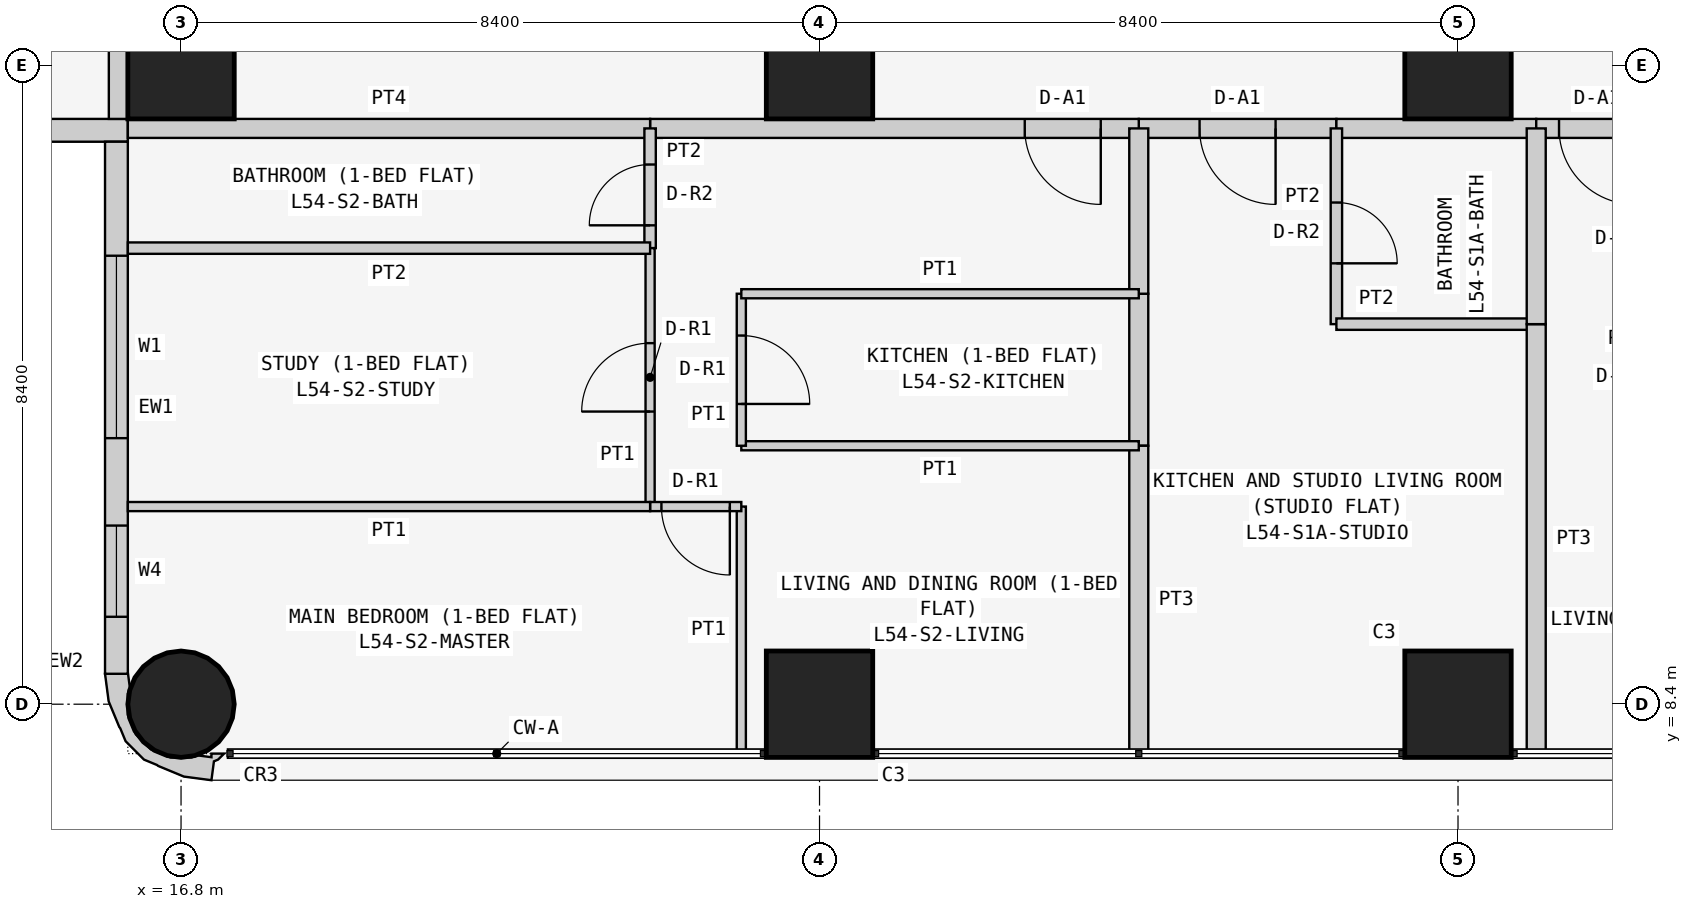
"""IFC4 building model, lengths in metres.
Left out: names, types, materials, properties, quantities, classifications, styles, units other than length and angle.
Written with IfcOpenShell. Run it as: python <this file> out.ifc"""

import sys

from ifc_helpers import new_model, si_unit, direction, frame, frame_2d, origin, origin_2d, place, context, subcontext, project, spatial, polyline, rectangle, circle, outline, extrude, element, fill, save


model = new_model("IFC4")
c1 = context("Model", 3, precision=1e-05, world=origin(), true_north=direction((0.0, 1.0)))
c2 = subcontext(c1, "Body", "Model", "MODEL_VIEW")
j1 = project(units=[si_unit("LENGTHUNIT", "METRE"), si_unit("PLANEANGLEUNIT", "RADIAN")], contexts=[c1])
p1 = place(None, origin())
s1 = spatial("IfcSite", under=j1, at=p1, CompositionType="ELEMENT")
p2 = place(p1, origin())
s2 = spatial("IfcBuilding", under=s1, at=p2, CompositionType="ELEMENT")
p3 = place(p2, frame((0.0, 0.0, 208.5)))
s3 = spatial("IfcBuildingStorey", under=s2, at=p3, CompositionType="ELEMENT", Elevation=208.5)
p4 = place(p3, frame((16.8, 8.4, 0.0), z_axis=(0.0, 0.0, 1.0), x_axis=(1.0, 0.0, 0.0)))
e1 = element("IfcColumn", 1, at=p4, inside=s3, PredefinedType="COLUMN", context=c2, shape_type="SweptSolid", body=[
    extrude(circle(Radius=0.7, at=origin_2d()), origin(), (0.0, 0.0, 1.0), 3.6),
])
for number, where, z_axis, x_axis in (
    (2, (16.8, 16.8, 0.0), (0.0, 0.0, 1.0), (1.0, 0.0, 0.0)),
    (3, (25.2, 8.4, 0.0), (0.0, 0.0, 1.0), (1.0, 0.0, 0.0)),
    (4, (25.2, 16.8, 0.0), (0.0, 0.0, 1.0), (1.0, 0.0, 0.0)),
    (5, (33.6, 8.4, 0.0), (0.0, 0.0, 1.0), (1.0, 0.0, 0.0)),
    (6, (33.6, 16.8, 0.0), (0.0, 0.0, 1.0), (1.0, 0.0, 0.0)),
):
    element("IfcColumn", number, at=place(p3, frame(where, z_axis=z_axis, x_axis=x_axis)), inside=s3, PredefinedType="COLUMN", context=c2, shape_type="SweptSolid", body=[
        extrude(rectangle(XDim=1.4, YDim=1.4, at=origin_2d()), origin(), (0.0, 0.0, 1.0), 3.6),
    ])
p5 = place(p3, frame((0.4, 15.95, 0.0), z_axis=(0.0, 0.0, 1.0), x_axis=(1.0, 0.0, 0.0)))
e7 = element("IfcWall", 7, at=p5, inside=s3, PredefinedType="SOLIDWALL", context=c2, shape_type="SweptSolid", body=[
    extrude(rectangle(XDim=15.7, YDim=0.3, at=frame_2d((7.85, 0.0))), origin(), (0.0, 0.0, 1.0), 3.45),
])
p6 = place(p5, frame((12.4, 0.0, 0.9)))
e8 = element("IfcOpeningElement", 8, at=p6, cuts=e7, PredefinedType="OPENING", context=c2, shape_type="SweptSolid", body=[
    extrude(rectangle(XDim=1.8, YDim=1.5, at=frame_2d((0.9, 0.75))), frame((0.0, 0.16, 0.0), z_axis=(0.0, -1.0, 0.0), x_axis=(1.0, 0.0, 0.0)), (0.0, 0.0, 1.0), 0.32),
])
p7 = place(p5, frame((9.55, 0.0, 1.5)))
e9 = element("IfcOpeningElement", 9, at=p7, cuts=e7, PredefinedType="OPENING", context=c2, shape_type="SweptSolid", body=[
    extrude(rectangle(XDim=0.9, YDim=0.7, at=frame_2d((0.45, 0.35))), frame((0.0, 0.16, 0.0), z_axis=(0.0, -1.0, 0.0), x_axis=(1.0, 0.0, 0.0)), (0.0, 0.0, 1.0), 0.32),
])
p8 = place(p5, frame((5.1, 0.0, 0.9)))
e10 = element("IfcOpeningElement", 10, at=p8, cuts=e7, PredefinedType="OPENING", context=c2, shape_type="SweptSolid", body=[
    extrude(rectangle(XDim=1.8, YDim=1.5, at=frame_2d((0.9, 0.75))), frame((0.0, 0.16, 0.0), z_axis=(0.0, -1.0, 0.0), x_axis=(1.0, 0.0, 0.0)), (0.0, 0.0, 1.0), 0.32),
])
p9 = place(p5, frame((2.0, 0.0, 0.0)))
e11 = element("IfcOpeningElement", 11, at=p9, cuts=e7, PredefinedType="OPENING", context=c2, shape_type="SweptSolid", body=[
    extrude(rectangle(XDim=0.9, YDim=2.4, at=frame_2d((0.45, 1.2))), frame((0.0, 0.16, 0.0), z_axis=(0.0, -1.0, 0.0), x_axis=(1.0, 0.0, 0.0)), (0.0, 0.0, 1.0), 0.32),
])
p10 = place(p5, frame((0.7, 0.0, 0.9)))
e12 = element("IfcOpeningElement", 12, at=p10, cuts=e7, PredefinedType="OPENING", context=c2, shape_type="SweptSolid", body=[
    extrude(rectangle(XDim=1.2, YDim=1.5, at=frame_2d((0.6, 0.75))), frame((0.0, 0.16, 0.0), z_axis=(0.0, -1.0, 0.0), x_axis=(1.0, 0.0, 0.0)), (0.0, 0.0, 1.0), 0.32),
])
p11 = place(p3, frame((15.95, 15.8, 0.0), z_axis=(0.0, 0.0, 1.0), x_axis=(0.0, -1.0, 0.0)))
e13 = element("IfcWall", 13, at=p11, inside=s3, PredefinedType="SOLIDWALL", context=c2, shape_type="SweptSolid", body=[
    extrude(rectangle(XDim=7.0, YDim=0.3, at=frame_2d((3.5, 0.0))), origin(), (0.0, 0.0, 1.0), 3.45),
])
p12 = place(p11, frame((1.5, 0.0, 0.9)))
e14 = element("IfcOpeningElement", 14, at=p12, cuts=e13, PredefinedType="OPENING", context=c2, shape_type="SweptSolid", body=[
    extrude(rectangle(XDim=2.4, YDim=1.5, at=frame_2d((1.2, 0.75))), frame((0.0, 0.16, 0.0), z_axis=(0.0, -1.0, 0.0), x_axis=(1.0, 0.0, 0.0)), (0.0, 0.0, 1.0), 0.32),
])
p13 = place(p11, frame((5.05, 0.0, 0.9)))
e15 = element("IfcOpeningElement", 15, at=p13, cuts=e13, PredefinedType="OPENING", context=c2, shape_type="SweptSolid", body=[
    extrude(rectangle(XDim=1.2, YDim=1.5, at=frame_2d((0.6, 0.75))), frame((0.0, 0.16, 0.0), z_axis=(0.0, -1.0, 0.0), x_axis=(1.0, 0.0, 0.0)), (0.0, 0.0, 1.0), 0.32),
])
p14 = place(p3, frame((16.076, 8.69, 0.0), z_axis=(0.0, 0.0, 1.0), x_axis=(-0.439933741929, -0.898030234854, 0.0)))
e16 = element("IfcWall", 16, at=p14, inside=s3, PredefinedType="SOLIDWALL", context=c2, shape_type="SweptSolid", body=[
    extrude(outline(polyline([(0.664, 1.577), (0.426, 1.497), (0.382, 1.536), (0.276, 1.572), (0.349, 1.423), (0.392, 1.444), (0.453, 1.261), (0.51, 1.211), (0.632, 0.961), (0.65, 0.683), (0.56, 0.419), (0.375, 0.21), (0.125, 0.087), (0.05, 0.082), (-0.127, -0.035), (-0.145, -0.044), (0.022, -0.296), (0.327, -0.094), (0.568, 0.18), (0.578, 0.199), (0.7, 0.337), (0.811, 0.661), (0.799, 0.846), (0.803, 0.866), (0.78, 1.231), (0.664, 1.577)])), origin(), (0.0, 0.0, 1.0), 3.45),
])
p15 = place(p3, frame((32.0, 15.975, 0.0), z_axis=(0.0, 0.0, 1.0), x_axis=(-1.0, 0.0, 0.0)))
e17 = element("IfcWall", 17, at=p15, inside=s3, PredefinedType="PARTITIONING", context=c2, shape_type="SweptSolid", body=[
    extrude(rectangle(XDim=2.6, YDim=0.25, at=frame_2d((1.3, 0.0))), origin(), (0.0, 0.0, 1.0), 3.45),
])
p16 = place(p15, frame((0.8, 0.0, 0.0)))
e18 = element("IfcOpeningElement", 18, at=p16, cuts=e17, PredefinedType="OPENING", context=c2, shape_type="SweptSolid", body=[
    extrude(rectangle(XDim=1.0, YDim=2.1, at=frame_2d((0.5, 1.05))), frame((0.0, 0.135, 0.0), z_axis=(0.0, -1.0, 0.0), x_axis=(1.0, 0.0, 0.0)), (0.0, 0.0, 1.0), 0.27),
])
p17 = place(p3, frame((34.629, 15.975, 0.0), z_axis=(0.0, 0.0, 1.0), x_axis=(-1.0, 0.0, 0.0)))
e19 = element("IfcWall", 19, at=p17, inside=s3, PredefinedType="PARTITIONING", context=c2, shape_type="SweptSolid", body=[
    extrude(rectangle(XDim=2.629, YDim=0.25, at=frame_2d((1.314, 0.0))), origin(), (0.0, 0.0, 1.0), 3.45),
])
p18 = place(p3, frame((36.229, 15.975, 0.0), z_axis=(0.0, 0.0, 1.0), x_axis=(-1.0, 0.0, 0.0)))
e20 = element("IfcWall", 20, at=p18, inside=s3, PredefinedType="PARTITIONING", context=c2, shape_type="SweptSolid", body=[
    extrude(rectangle(XDim=1.6, YDim=0.25, at=frame_2d((0.8, 0.0))), origin(), (0.0, 0.0, 1.0), 3.45),
])
p19 = place(p18, frame((0.3, 0.0, 0.0)))
e21 = element("IfcOpeningElement", 21, at=p19, cuts=e20, PredefinedType="OPENING", context=c2, shape_type="SweptSolid", body=[
    extrude(rectangle(XDim=1.0, YDim=2.1, at=frame_2d((0.5, 1.05))), frame((0.0, 0.135, 0.0), z_axis=(0.0, -1.0, 0.0), x_axis=(1.0, 0.0, 0.0)), (0.0, 0.0, 1.0), 0.27),
])
p20 = place(p3, frame((29.4, 15.975, 0.0), z_axis=(0.0, 0.0, 1.0), x_axis=(-1.0, 0.0, 0.0)))
e22 = element("IfcWall", 22, at=p20, inside=s3, PredefinedType="PARTITIONING", context=c2, shape_type="SweptSolid", body=[
    extrude(rectangle(XDim=6.429, YDim=0.25, at=frame_2d((3.214, 0.0))), origin(), (0.0, 0.0, 1.0), 3.45),
])
p21 = place(p20, frame((0.5, 0.0, 0.0)))
e23 = element("IfcOpeningElement", 23, at=p21, cuts=e22, PredefinedType="OPENING", context=c2, shape_type="SweptSolid", body=[
    extrude(rectangle(XDim=1.0, YDim=2.1, at=frame_2d((0.5, 1.05))), frame((0.0, 0.135, 0.0), z_axis=(0.0, -1.0, 0.0), x_axis=(1.0, 0.0, 0.0)), (0.0, 0.0, 1.0), 0.27),
])
for number, where, z_axis, x_axis in (
    (24, (22.971, 15.975, 0.0), (0.0, 0.0, 1.0), (-1.0, 0.0, 0.0)),
    (25, (15.975, 16.1, 0.0), (0.0, 0.0, 1.0), (0.0, 1.0, 0.0)),
):
    element("IfcWall", number, at=place(p3, frame(where, z_axis=z_axis, x_axis=x_axis)), inside=s3, PredefinedType="PARTITIONING", context=c2, shape_type="SweptSolid", body=[
        extrude(rectangle(XDim=6.871, YDim=0.25, at=frame_2d((3.436, 0.0))), origin(), (0.0, 0.0, 1.0), 3.45),
    ])
p22 = place(p3, frame((32.0, 15.975, 0.0), z_axis=(0.0, 0.0, 1.0), x_axis=(0.0, -1.0, 0.0)))
e26 = element("IfcWall", 26, at=p22, inside=s3, PredefinedType="PARTITIONING", context=c2, shape_type="SweptSolid", body=[
    extrude(rectangle(XDim=2.575, YDim=0.15, at=frame_2d((1.288, 0.0))), origin(), (0.0, 0.0, 1.0), 3.45),
])
p23 = place(p22, frame((0.975, 0.0, 0.0)))
e27 = element("IfcOpeningElement", 27, at=p23, cuts=e26, PredefinedType="OPENING", context=c2, shape_type="SweptSolid", body=[
    extrude(rectangle(XDim=0.8, YDim=2.1, at=frame_2d((0.4, 1.05))), frame((0.0, 0.085, 0.0), z_axis=(0.0, -1.0, 0.0), x_axis=(1.0, 0.0, 0.0)), (0.0, 0.0, 1.0), 0.17),
])
p24 = place(p3, frame((32.0, 13.4, 0.0), z_axis=(0.0, 0.0, 1.0), x_axis=(1.0, 0.0, 0.0)))
e28 = element("IfcWall", 28, at=p24, inside=s3, PredefinedType="PARTITIONING", context=c2, shape_type="SweptSolid", body=[
    extrude(rectangle(XDim=2.629, YDim=0.15, at=frame_2d((1.314, 0.0))), origin(), (0.0, 0.0, 1.0), 3.45),
])
p25 = place(p3, frame((34.629, 13.4, 0.0), z_axis=(0.0, 0.0, 1.0), x_axis=(0.0, -1.0, 0.0)))
e29 = element("IfcWall", 29, at=p25, inside=s3, PredefinedType="PARTITIONING", context=c2, shape_type="SweptSolid", body=[
    extrude(rectangle(XDim=5.65, YDim=0.25, at=frame_2d((2.825, 0.0))), origin(), (0.0, 0.0, 1.0), 3.45),
])
p26 = place(p3, frame((29.4, 11.8, 0.0), z_axis=(0.0, 0.0, 1.0), x_axis=(0.0, 1.0, 0.0)))
e30 = element("IfcWall", 30, at=p26, inside=s3, PredefinedType="PARTITIONING", context=c2, shape_type="SweptSolid", body=[
    extrude(rectangle(XDim=2.0, YDim=0.25, at=frame_2d((1.0, 0.0))), origin(), (0.0, 0.0, 1.0), 2.848),
])
p27 = place(p3, frame((29.4, 7.75, 0.0), z_axis=(0.0, 0.0, 1.0), x_axis=(0.0, 1.0, 0.0)))
e31 = element("IfcWall", 31, at=p27, inside=s3, PredefinedType="PARTITIONING", context=c2, shape_type="SweptSolid", body=[
    extrude(rectangle(XDim=4.05, YDim=0.25, at=frame_2d((2.025, 0.0))), origin(), (0.0, 0.0, 1.0), 2.848),
])
p28 = place(p3, frame((29.4, 13.8, 0.0), z_axis=(0.0, 0.0, 1.0), x_axis=(0.0, 1.0, 0.0)))
e32 = element("IfcWall", 32, at=p28, inside=s3, PredefinedType="PARTITIONING", context=c2, shape_type="SweptSolid", body=[
    extrude(rectangle(XDim=2.175, YDim=0.25, at=frame_2d((1.087, 0.0))), origin(), (0.0, 0.0, 1.0), 2.848),
])
p29 = place(p3, frame((34.629, 13.4, 0.0), z_axis=(0.0, 0.0, 1.0), x_axis=(0.0, 1.0, 0.0)))
e33 = element("IfcWall", 33, at=p29, inside=s3, PredefinedType="PARTITIONING", context=c2, shape_type="SweptSolid", body=[
    extrude(rectangle(XDim=2.575, YDim=0.25, at=frame_2d((1.288, 0.0))), origin(), (0.0, 0.0, 1.0), 3.45),
])
p30 = place(p3, frame((29.4, 11.8, 0.0), z_axis=(0.0, 0.0, 1.0), x_axis=(-1.0, 0.0, 0.0)))
e34 = element("IfcWall", 34, at=p30, inside=s3, PredefinedType="PARTITIONING", context=c2, shape_type="SweptSolid", body=[
    extrude(rectangle(XDim=5.229, YDim=0.12, at=frame_2d((2.615, 0.0))), origin(), (0.0, 0.0, 1.0), 3.45),
])
p31 = place(p3, frame((24.171, 11.8, 0.0), z_axis=(0.0, 0.0, 1.0), x_axis=(0.0, 1.0, 0.0)))
e35 = element("IfcWall", 35, at=p31, inside=s3, PredefinedType="PARTITIONING", context=c2, shape_type="SweptSolid", body=[
    extrude(rectangle(XDim=2.0, YDim=0.12, at=frame_2d((1.0, 0.0))), origin(), (0.0, 0.0, 1.0), 3.45),
])
p32 = place(p31, frame((0.55, 0.0, 0.0)))
e36 = element("IfcOpeningElement", 36, at=p32, cuts=e35, PredefinedType="OPENING", context=c2, shape_type="SweptSolid", body=[
    extrude(rectangle(XDim=0.9, YDim=2.1, at=frame_2d((0.45, 1.05))), frame((0.0, 0.07, 0.0), z_axis=(0.0, -1.0, 0.0), x_axis=(1.0, 0.0, 0.0)), (0.0, 0.0, 1.0), 0.14),
])
p33 = place(p3, frame((24.171, 13.8, 0.0), z_axis=(0.0, 0.0, 1.0), x_axis=(1.0, 0.0, 0.0)))
e37 = element("IfcWall", 37, at=p33, inside=s3, PredefinedType="PARTITIONING", context=c2, shape_type="SweptSolid", body=[
    extrude(rectangle(XDim=5.229, YDim=0.12, at=frame_2d((2.615, 0.0))), origin(), (0.0, 0.0, 1.0), 3.45),
])
p34 = place(p3, frame((22.971, 14.4, 0.0), z_axis=(0.0, 0.0, 1.0), x_axis=(0.0, 1.0, 0.0)))
e38 = element("IfcWall", 38, at=p34, inside=s3, PredefinedType="PARTITIONING", context=c2, shape_type="SweptSolid", body=[
    extrude(rectangle(XDim=1.575, YDim=0.15, at=frame_2d((0.788, 0.0))), origin(), (0.0, 0.0, 1.0), 3.45),
])
p35 = place(p34, frame((0.3, 0.0, 0.0)))
e39 = element("IfcOpeningElement", 39, at=p35, cuts=e38, PredefinedType="OPENING", context=c2, shape_type="SweptSolid", body=[
    extrude(rectangle(XDim=0.8, YDim=2.1, at=frame_2d((0.4, 1.05))), frame((0.0, 0.085, 0.0), z_axis=(0.0, -1.0, 0.0), x_axis=(1.0, 0.0, 0.0)), (0.0, 0.0, 1.0), 0.17),
])
p36 = place(p3, frame((22.971, 11.0, 0.0), z_axis=(0.0, 0.0, 1.0), x_axis=(0.0, 1.0, 0.0)))
e40 = element("IfcWall", 40, at=p36, inside=s3, PredefinedType="PARTITIONING", context=c2, shape_type="SweptSolid", body=[
    extrude(rectangle(XDim=3.4, YDim=0.12, at=frame_2d((1.7, 0.0))), origin(), (0.0, 0.0, 1.0), 3.45),
])
p37 = place(p36, frame((1.25, 0.0, 0.0)))
e41 = element("IfcOpeningElement", 41, at=p37, cuts=e40, PredefinedType="OPENING", context=c2, shape_type="SweptSolid", body=[
    extrude(rectangle(XDim=0.9, YDim=2.1, at=frame_2d((0.45, 1.05))), frame((0.0, 0.07, 0.0), z_axis=(0.0, -1.0, 0.0), x_axis=(1.0, 0.0, 0.0)), (0.0, 0.0, 1.0), 0.14),
])
p38 = place(p3, frame((24.171, 7.75, 0.0), z_axis=(0.0, 0.0, 1.0), x_axis=(0.0, 1.0, 0.0)))
e42 = element("IfcWall", 42, at=p38, inside=s3, PredefinedType="PARTITIONING", context=c2, shape_type="SweptSolid", body=[
    extrude(rectangle(XDim=3.25, YDim=0.12, at=frame_2d((1.625, 0.0))), origin(), (0.0, 0.0, 1.0), 3.45),
])
p39 = place(p3, frame((24.171, 11.0, 0.0), z_axis=(0.0, 0.0, 1.0), x_axis=(-1.0, 0.0, 0.0)))
e43 = element("IfcWall", 43, at=p39, inside=s3, PredefinedType="PARTITIONING", context=c2, shape_type="SweptSolid", body=[
    extrude(rectangle(XDim=1.2, YDim=0.12, at=frame_2d((0.6, 0.0))), origin(), (0.0, 0.0, 1.0), 3.45),
])
p40 = place(p39, frame((0.151, 0.0, 0.0)))
e44 = element("IfcOpeningElement", 44, at=p40, cuts=e43, PredefinedType="OPENING", context=c2, shape_type="SweptSolid", body=[
    extrude(rectangle(XDim=0.9, YDim=2.1, at=frame_2d((0.45, 1.05))), frame((0.0, 0.07, 0.0), z_axis=(0.0, -1.0, 0.0), x_axis=(1.0, 0.0, 0.0)), (0.0, 0.0, 1.0), 0.14),
])
p41 = place(p3, frame((22.971, 14.4, 0.0), z_axis=(0.0, 0.0, 1.0), x_axis=(-1.0, 0.0, 0.0)))
e45 = element("IfcWall", 45, at=p41, inside=s3, PredefinedType="PARTITIONING", context=c2, shape_type="SweptSolid", body=[
    extrude(rectangle(XDim=6.871, YDim=0.15, at=frame_2d((3.436, 0.0))), origin(), (0.0, 0.0, 1.0), 3.45),
])
p42 = place(p3, frame((22.971, 11.0, 0.0), z_axis=(0.0, 0.0, 1.0), x_axis=(-1.0, 0.0, 0.0)))
e46 = element("IfcWall", 46, at=p42, inside=s3, PredefinedType="PARTITIONING", context=c2, shape_type="SweptSolid", body=[
    extrude(rectangle(XDim=6.871, YDim=0.12, at=frame_2d((3.436, 0.0))), origin(), (0.0, 0.0, 1.0), 3.45),
])
p43 = place(p12, origin())
e47 = element("IfcWindow", 47, at=p43, inside=s3, PartitioningType="SINGLE_PANEL", PredefinedType="WINDOW", context=c2, shape_type="SweptSolid", body=[
    extrude(rectangle(XDim=2.4, YDim=1.5, at=frame_2d((1.2, 0.75))), frame((0.0, 0.03, 0.0), z_axis=(0.0, -1.0, 0.0), x_axis=(1.0, 0.0, 0.0)), (0.0, 0.0, 1.0), 0.06),
])
fill(e14, e47)
p44 = place(p13, origin())
e48 = element("IfcWindow", 48, at=p44, inside=s3, PartitioningType="SINGLE_PANEL", PredefinedType="WINDOW", context=c2, shape_type="SweptSolid", body=[
    extrude(rectangle(XDim=1.2, YDim=1.5, at=frame_2d((0.6, 0.75))), frame((0.0, 0.03, 0.0), z_axis=(0.0, -1.0, 0.0), x_axis=(1.0, 0.0, 0.0)), (0.0, 0.0, 1.0), 0.06),
])
fill(e15, e48)
p45 = place(p16, origin())
e49 = element("IfcDoor", 49, at=p45, inside=s3, OperationType="SINGLE_SWING_LEFT", PredefinedType="DOOR", context=c2, shape_type="SweptSolid", body=[
    extrude(rectangle(XDim=1.0, YDim=2.1, at=frame_2d((0.5, 1.05))), frame((0.0, 0.025, 0.0), z_axis=(0.0, -1.0, 0.0), x_axis=(1.0, 0.0, 0.0)), (0.0, 0.0, 1.0), 0.05),
])
fill(e18, e49)
p46 = place(p23, origin())
e50 = element("IfcDoor", 50, at=p46, inside=s3, OperationType="SINGLE_SWING_RIGHT", PredefinedType="DOOR", context=c2, shape_type="SweptSolid", body=[
    extrude(rectangle(XDim=0.8, YDim=2.1, at=frame_2d((0.4, 1.05))), frame((0.0, 0.025, 0.0), z_axis=(0.0, -1.0, 0.0), x_axis=(1.0, 0.0, 0.0)), (0.0, 0.0, 1.0), 0.05),
])
fill(e27, e50)
p47 = place(p19, origin())
e51 = element("IfcDoor", 51, at=p47, inside=s3, OperationType="SINGLE_SWING_LEFT", PredefinedType="DOOR", context=c2, shape_type="SweptSolid", body=[
    extrude(rectangle(XDim=1.0, YDim=2.1, at=frame_2d((0.5, 1.05))), frame((0.0, 0.025, 0.0), z_axis=(0.0, -1.0, 0.0), x_axis=(1.0, 0.0, 0.0)), (0.0, 0.0, 1.0), 0.05),
])
fill(e21, e51)
p48 = place(p21, origin())
e52 = element("IfcDoor", 52, at=p48, inside=s3, OperationType="SINGLE_SWING_LEFT", PredefinedType="DOOR", context=c2, shape_type="SweptSolid", body=[
    extrude(rectangle(XDim=1.0, YDim=2.1, at=frame_2d((0.5, 1.05))), frame((0.0, 0.025, 0.0), z_axis=(0.0, -1.0, 0.0), x_axis=(1.0, 0.0, 0.0)), (0.0, 0.0, 1.0), 0.05),
])
fill(e23, e52)
p49 = place(p32, frame((0.9, 0.0, 0.0), z_axis=(0.0, 0.0, 1.0), x_axis=(-1.0, 0.0, 0.0)))
e53 = element("IfcDoor", 53, at=p49, inside=s3, OperationType="SINGLE_SWING_RIGHT", PredefinedType="DOOR", context=c2, shape_type="SweptSolid", body=[
    extrude(rectangle(XDim=0.9, YDim=2.1, at=frame_2d((0.45, 1.05))), frame((0.0, 0.025, 0.0), z_axis=(0.0, -1.0, 0.0), x_axis=(1.0, 0.0, 0.0)), (0.0, 0.0, 1.0), 0.05),
])
fill(e36, e53)
p50 = place(p35, origin())
e54 = element("IfcDoor", 54, at=p50, inside=s3, OperationType="SINGLE_SWING_LEFT", PredefinedType="DOOR", context=c2, shape_type="SweptSolid", body=[
    extrude(rectangle(XDim=0.8, YDim=2.1, at=frame_2d((0.4, 1.05))), frame((0.0, 0.025, 0.0), z_axis=(0.0, -1.0, 0.0), x_axis=(1.0, 0.0, 0.0)), (0.0, 0.0, 1.0), 0.05),
])
fill(e39, e54)
p51 = place(p37, origin())
e55 = element("IfcDoor", 55, at=p51, inside=s3, OperationType="SINGLE_SWING_LEFT", PredefinedType="DOOR", context=c2, shape_type="SweptSolid", body=[
    extrude(rectangle(XDim=0.9, YDim=2.1, at=frame_2d((0.45, 1.05))), frame((0.0, 0.025, 0.0), z_axis=(0.0, -1.0, 0.0), x_axis=(1.0, 0.0, 0.0)), (0.0, 0.0, 1.0), 0.05),
])
fill(e41, e55)
p52 = place(p40, origin())
e56 = element("IfcDoor", 56, at=p52, inside=s3, OperationType="SINGLE_SWING_LEFT", PredefinedType="DOOR", context=c2, shape_type="SweptSolid", body=[
    extrude(rectangle(XDim=0.9, YDim=2.1, at=frame_2d((0.45, 1.05))), frame((0.0, 0.025, 0.0), z_axis=(0.0, -1.0, 0.0), x_axis=(1.0, 0.0, 0.0)), (0.0, 0.0, 1.0), 0.05),
])
fill(e44, e56)
save(model, sys.argv[1])
